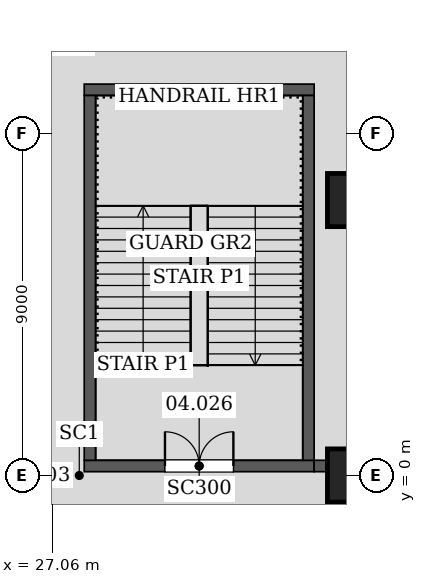
"""IFC4 building model, lengths in metres.
Left out: names, types, materials, properties, quantities, classifications, styles, units other than length and angle.
Written with IfcOpenShell. Run it as: python <this file> out.ifc"""

import sys

from ifc_helpers import new_model, si_unit, direction, frame, frame_2d, origin, origin_2d, place, context, subcontext, project, spatial, rectangle, extrude, element, fill, save


model = new_model("IFC4")
c1 = context("Model", 3, precision=1e-05, world=origin(), true_north=direction((0.0, 1.0)))
c2 = subcontext(c1, "Body", "Model", "MODEL_VIEW")
j1 = project(units=[si_unit("LENGTHUNIT", "METRE"), si_unit("PLANEANGLEUNIT", "RADIAN")], contexts=[c1])
p1 = place(None, origin())
s1 = spatial("IfcSite", under=j1, at=p1, CompositionType="ELEMENT")
p2 = place(p1, origin())
s2 = spatial("IfcBuilding", under=s1, at=p2, CompositionType="ELEMENT")
p3 = place(p2, frame((0.0, 0.0, 24.0)))
s3 = spatial("IfcBuildingStorey", under=s2, at=p3, CompositionType="ELEMENT", Elevation=24.0)
for number, where, z_axis, x_axis in (
    (1, (35.0, 0.0, 0.0), (0.0, 0.0, 1.0), (1.0, 0.0, 0.0)),
    (2, (35.0, 7.249, 0.0), (0.0, 0.0, 1.0), (1.0, 0.0, 0.0)),
):
    element("IfcColumn", number, at=place(p3, frame(where, z_axis=z_axis, x_axis=x_axis)), inside=s3, PredefinedType="COLUMN", context=c2, shape_type="SweptSolid", body=[
        extrude(rectangle(XDim=1.4, YDim=1.4, at=origin_2d()), origin(), (0.0, 0.0, 1.0), 4.8),
    ])
p4 = place(p3, frame((27.9, 0.25, 0.0), z_axis=(0.0, 0.0, 1.0), x_axis=(1.0, 0.0, 0.0)))
e3 = element("IfcWall", 3, at=p4, inside=s3, PredefinedType="SOLIDWALL", context=c2, shape_type="SweptSolid", body=[
    extrude(rectangle(XDim=6.05, YDim=0.3, at=frame_2d((3.025, 0.0))), origin(), (0.0, 0.0, 1.0), 4.8),
])
p5 = place(p4, frame((2.125, 0.0, 0.0)))
e4 = element("IfcOpeningElement", 4, at=p5, cuts=e3, PredefinedType="OPENING", context=c2, shape_type="SweptSolid", body=[
    extrude(rectangle(XDim=1.8, YDim=2.1, at=frame_2d((0.9, 1.05))), frame((0.0, 0.16, 0.0), z_axis=(0.0, -1.0, 0.0), x_axis=(1.0, 0.0, 0.0)), (0.0, 0.0, 1.0), 0.32),
])
p6 = place(p3, frame((33.95, 0.25, 0.0), z_axis=(0.0, 0.0, 1.0), x_axis=(1.0, 0.0, 0.0)))
e5 = element("IfcWall", 5, at=p6, inside=s3, PredefinedType="SOLIDWALL", context=c2, shape_type="SweptSolid", body=[
    extrude(rectangle(XDim=0.35, YDim=0.3, at=frame_2d((0.175, 0.0))), origin(), (0.0, 0.0, 1.0), 3.817),
])
p7 = place(p3, frame((33.95, 10.15, 0.0), z_axis=(0.0, 0.0, 1.0), x_axis=(-1.0, 0.0, 0.0)))
e6 = element("IfcWall", 6, at=p7, inside=s3, PredefinedType="SOLIDWALL", context=c2, shape_type="SweptSolid", body=[
    extrude(rectangle(XDim=6.05, YDim=0.3, at=frame_2d((3.025, 0.0))), origin(), (0.0, 0.0, 1.0), 4.8),
])
for number, where, z_axis, x_axis in (
    (7, (28.05, 10.0, 0.0), (0.0, 0.0, 1.0), (0.0, -1.0, 0.0)),
    (8, (33.8, 0.4, 0.0), (0.0, 0.0, 1.0), (0.0, 1.0, 0.0)),
):
    element("IfcWall", number, at=place(p3, frame(where, z_axis=z_axis, x_axis=x_axis)), inside=s3, PredefinedType="SOLIDWALL", context=c2, shape_type="SweptSolid", body=[
        extrude(rectangle(XDim=9.6, YDim=0.3, at=frame_2d((4.8, 0.0))), origin(), (0.0, 0.0, 1.0), 4.8),
    ])
p8 = place(p5, origin())
e9 = element("IfcDoor", 9, at=p8, inside=s3, OperationType="DOUBLE_DOOR_SINGLE_SWING", PredefinedType="DOOR", context=c2, shape_type="SweptSolid", body=[
    extrude(rectangle(XDim=1.8, YDim=2.1, at=frame_2d((0.9, 1.05))), frame((0.0, 0.025, 0.0), z_axis=(0.0, -1.0, 0.0), x_axis=(1.0, 0.0, 0.0)), (0.0, 0.0, 1.0), 0.05),
])
fill(e4, e9)
save(model, sys.argv[1])
